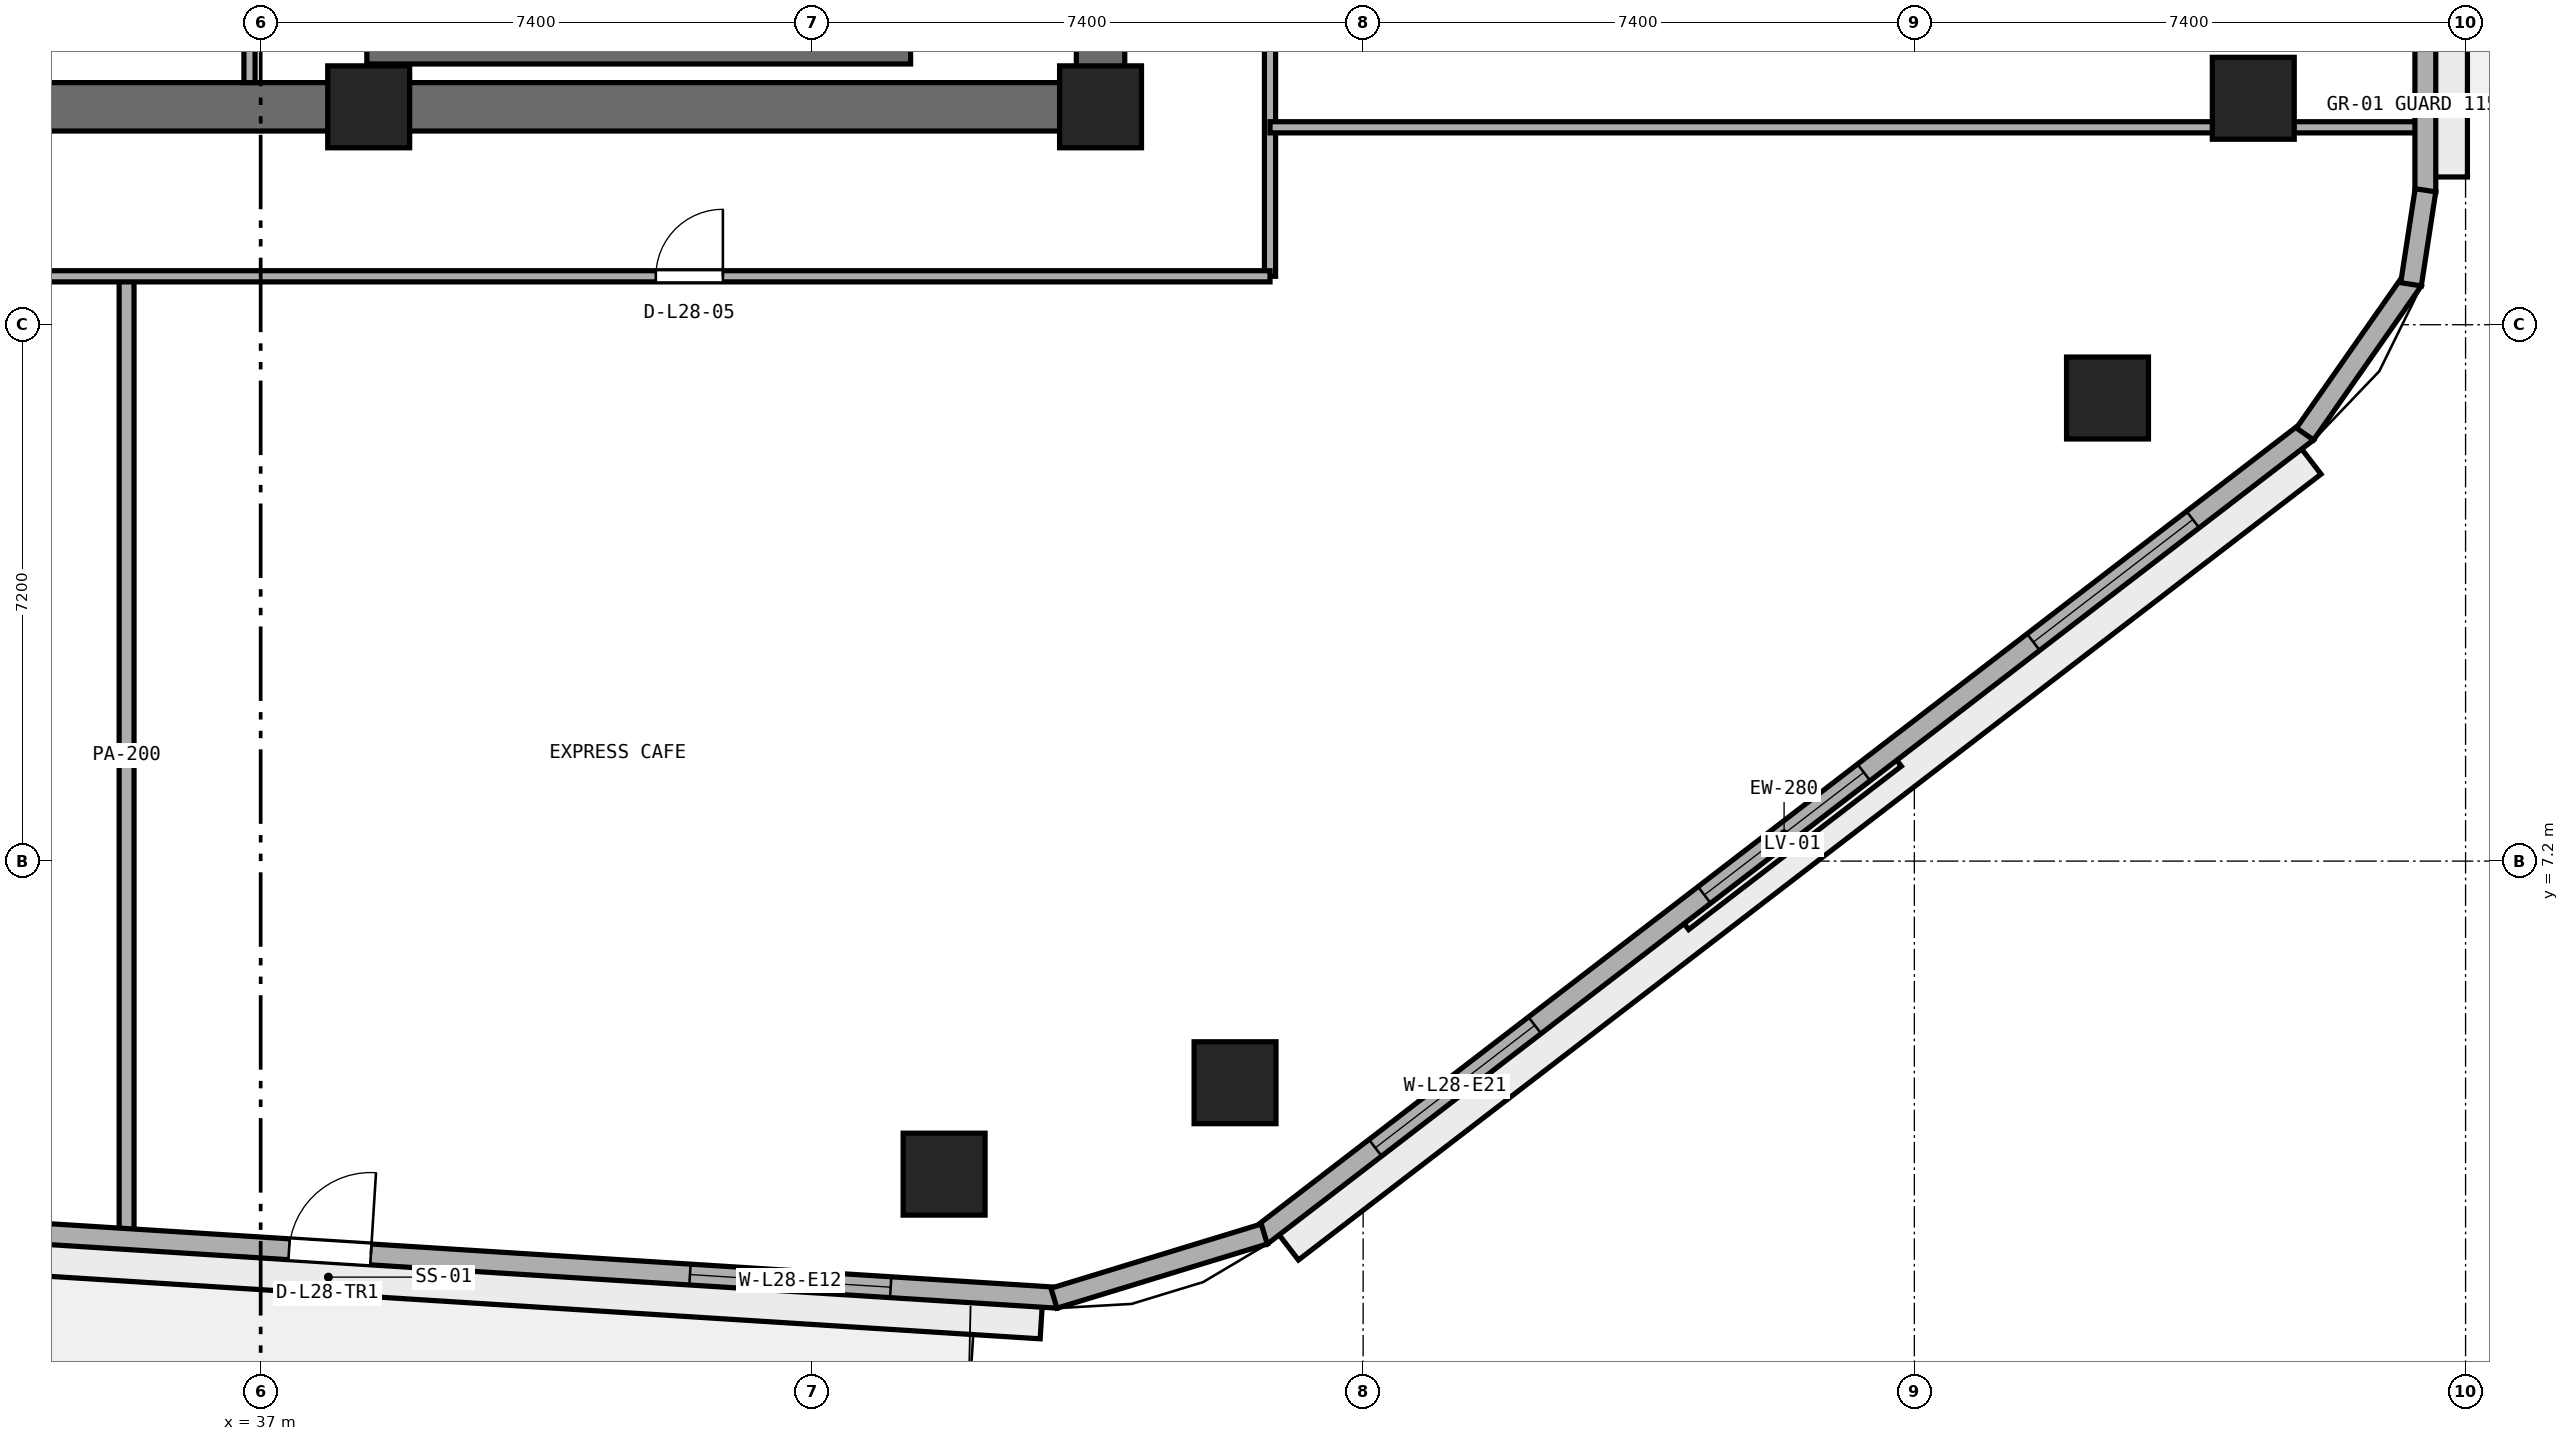
"""IFC4 building model, lengths in metres.
Left out: names, types, materials, properties, quantities, classifications, styles, units other than length and angle.
Written with IfcOpenShell. Run it as: python <this file> out.ifc"""

import sys

from ifc_helpers import new_model, si_unit, direction, frame, frame_2d, origin, origin_2d, place, context, subcontext, project, spatial, rectangle, extrude, element, fill, save


model = new_model("IFC4")
c1 = context("Model", 3, precision=1e-05, world=origin(), true_north=direction((0.0, 1.0)))
c2 = subcontext(c1, "Body", "Model", "MODEL_VIEW")
j1 = project(units=[si_unit("LENGTHUNIT", "METRE"), si_unit("PLANEANGLEUNIT", "RADIAN")], contexts=[c1])
p1 = place(None, origin())
s1 = spatial("IfcSite", under=j1, at=p1, CompositionType="ELEMENT")
p2 = place(p1, origin())
s2 = spatial("IfcBuilding", under=s1, at=p2, CompositionType="ELEMENT")
p3 = place(p2, frame((0.0, 0.0, 112.4)))
s3 = spatial("IfcBuildingStorey", under=s2, at=p3, CompositionType="ELEMENT", Elevation=112.4)
p4 = place(p3, frame((25.4, 17.325, 0.0), z_axis=(0.0, 0.0, 1.0), x_axis=(1.0, 0.0, 0.0)))
e1 = element("IfcWall", 1, at=p4, inside=s3, PredefinedType="SHEAR", context=c2, shape_type="SweptSolid", body=[
    extrude(rectangle(XDim=23.2, YDim=0.65, at=frame_2d((11.6, 0.0))), origin(), (0.0, 0.0, 1.0), 3.525),
])
p5 = place(p3, frame((48.275, 17.65, 0.0), z_axis=(0.0, 0.0, 1.0), x_axis=(0.0, 1.0, 0.0)))
e2 = element("IfcWall", 2, at=p5, inside=s3, PredefinedType="SHEAR", context=c2, shape_type="SweptSolid", body=[
    extrude(rectangle(XDim=15.1, YDim=0.65, at=frame_2d((7.55, 0.0))), origin(), (0.0, 0.0, 1.0), 3.525),
])
p6 = place(p5, frame((5.65, 0.0, 0.0)))
e3 = element("IfcOpeningElement", 3, at=p6, cuts=e2, PredefinedType="OPENING", context=c2, shape_type="SweptSolid", body=[
    extrude(rectangle(XDim=1.5, YDim=2.15, at=frame_2d((0.75, 1.075))), frame((0.0, 0.335, 0.0), z_axis=(0.0, -1.0, 0.0), x_axis=(1.0, 0.0, 0.0)), (0.0, 0.0, 1.0), 0.67),
])
for number, where, z_axis, x_axis in (
    (4, (38.45, 17.325, 0.0), (0.0, 0.0, 1.0), (1.0, 0.0, 0.0)),
    (5, (48.275, 17.325, 0.0), (0.0, 0.0, 1.0), (1.0, 0.0, 0.0)),
):
    element("IfcColumn", number, at=place(p3, frame(where, z_axis=z_axis, x_axis=x_axis)), inside=s3, PredefinedType="PILASTER", context=c2, shape_type="SweptSolid", body=[
        extrude(rectangle(XDim=1.1, YDim=1.1, at=origin_2d()), origin(), (0.0, 0.0, 1.0), 3.8),
    ])
for number, where, z_axis, x_axis in (
    (6, (46.175, 2.998, 0.0), (0.0, 0.0, 1.0), (1.0, 0.0, 0.0)),
    (7, (50.081, 4.225, 0.0), (0.0, 0.0, 1.0), (1.0, 0.0, 0.0)),
    (8, (61.793, 13.416, 0.0), (0.0, 0.0, 1.0), (1.0, 0.0, 0.0)),
    (9, (63.75, 17.44, 0.0), (0.0, 0.0, 1.0), (1.0, 0.0, 0.0)),
):
    element("IfcColumn", number, at=place(p3, frame(where, z_axis=z_axis, x_axis=x_axis)), inside=s3, PredefinedType="COLUMN", context=c2, shape_type="SweptSolid", body=[
        extrude(rectangle(XDim=1.1, YDim=1.1, at=origin_2d()), origin(), (0.0, 0.0, 1.0), 3.8),
    ])
p7 = place(p3, frame((38.425, 18.025, 0.0), z_axis=(0.0, 0.0, 1.0), x_axis=(1.0, 0.0, 0.0)))
e10 = element("IfcWall", 10, at=p7, inside=s3, PredefinedType="SHEAR", context=c2, shape_type="SweptSolid", body=[
    extrude(rectangle(XDim=7.3, YDim=0.25, at=frame_2d((3.65, 0.0))), origin(), (0.0, 0.0, 1.0), 3.525),
])
p8 = place(p3, frame((36.85, 17.65, 0.0), z_axis=(0.0, 0.0, 1.0), x_axis=(0.0, 1.0, 0.0)))
e11 = element("IfcWall", 11, at=p8, inside=s3, PredefinedType="PARTITIONING", context=c2, shape_type="SweptSolid", body=[
    extrude(rectangle(XDim=2.1, YDim=0.15, at=frame_2d((1.05, 0.0))), origin(), (0.0, 0.0, 1.0), 3.525),
])
p9 = place(p3, frame((50.55, 15.05, 0.0), z_axis=(0.0, 0.0, 1.0), x_axis=(0.0, 1.0, 0.0)))
e12 = element("IfcWall", 12, at=p9, inside=s3, PredefinedType="PARTITIONING", context=c2, shape_type="SweptSolid", body=[
    extrude(rectangle(XDim=20.3, YDim=0.15, at=frame_2d((10.15, 0.0))), origin(), (0.0, 0.0, 1.0), 3.525),
])
p10 = place(p9, frame((9.7, 0.0, 0.0)))
e13 = element("IfcOpeningElement", 13, at=p10, cuts=e12, PredefinedType="OPENING", context=c2, shape_type="SweptSolid", body=[
    extrude(rectangle(XDim=0.9, YDim=2.1, at=frame_2d((0.45, 1.05))), frame((0.0, 0.085, 0.0), z_axis=(0.0, -1.0, 0.0), x_axis=(1.0, 0.0, 0.0)), (0.0, 0.0, 1.0), 0.17),
])
p11 = place(p3, frame((35.2, 2.192, 0.0), z_axis=(0.0, 0.0, 1.0), x_axis=(0.0, 1.0, 0.0)))
e14 = element("IfcWall", 14, at=p11, inside=s3, PredefinedType="PARTITIONING", context=c2, shape_type="SweptSolid", body=[
    extrude(rectangle(XDim=12.858, YDim=0.2, at=frame_2d((6.429, 0.0))), origin(), (0.0, 0.0, 1.0), 3.525),
])
p12 = place(p3, frame((23.45, 15.05, 0.0), z_axis=(0.0, 0.0, 1.0), x_axis=(1.0, 0.0, 0.0)))
e15 = element("IfcWall", 15, at=p12, inside=s3, PredefinedType="PARTITIONING", context=c2, shape_type="SweptSolid", body=[
    extrude(rectangle(XDim=27.1, YDim=0.15, at=frame_2d((13.55, 0.0))), origin(), (0.0, 0.0, 1.0), 3.525),
])
p13 = place(p12, frame((5.17, 0.0, 0.0)))
e16 = element("IfcOpeningElement", 16, at=p13, cuts=e15, PredefinedType="OPENING", context=c2, shape_type="SweptSolid", body=[
    extrude(rectangle(XDim=1.65, YDim=2.15, at=frame_2d((0.825, 1.075))), frame((0.0, 0.085, 0.0), z_axis=(0.0, -1.0, 0.0), x_axis=(1.0, 0.0, 0.0)), (0.0, 0.0, 1.0), 0.17),
])
p14 = place(p12, frame((18.855, 0.0, 0.0)))
e17 = element("IfcOpeningElement", 17, at=p14, cuts=e15, PredefinedType="OPENING", context=c2, shape_type="SweptSolid", body=[
    extrude(rectangle(XDim=0.9, YDim=2.1, at=frame_2d((0.45, 1.05))), frame((0.0, 0.085, 0.0), z_axis=(0.0, -1.0, 0.0), x_axis=(1.0, 0.0, 0.0)), (0.0, 0.0, 1.0), 0.17),
])
p15 = place(p3, frame((50.55, 17.05, 0.0), z_axis=(0.0, 0.0, 1.0), x_axis=(1.0, 0.0, 0.0)))
e18 = element("IfcWall", 18, at=p15, inside=s3, PredefinedType="PARTITIONING", context=c2, shape_type="SweptSolid", body=[
    extrude(rectangle(XDim=15.445, YDim=0.15, at=frame_2d((7.723, 0.0))), origin(), (0.0, 0.0, 1.0), 3.525),
])
p16 = place(p3, frame((28.161, 2.571, 0.0), z_axis=(0.0, 0.0, 1.0), x_axis=(0.998017288298, -0.06294038654, 0.0)))
e19 = element("IfcWall", 19, at=p16, inside=s3, PredefinedType="STANDARD", context=c2, shape_type="SweptSolid", body=[
    extrude(rectangle(XDim=19.577, YDim=0.28, at=frame_2d((9.789, 0.0))), origin(), (0.0, 0.0, 1.0), 3.525),
])
p17 = place(p16, frame((9.239, 0.0, 0.0)))
e20 = element("IfcOpeningElement", 20, at=p17, cuts=e19, PredefinedType="OPENING", context=c2, shape_type="SweptSolid", body=[
    extrude(rectangle(XDim=1.1, YDim=2.2, at=frame_2d((0.55, 1.1))), frame((0.0, 0.15, 0.0), z_axis=(0.0, -1.0, 0.0), x_axis=(1.0, 0.0, 0.0)), (0.0, 0.0, 1.0), 0.3),
])
p18 = place(p16, frame((2.246, 0.0, 0.9)))
e21 = element("IfcOpeningElement", 21, at=p18, cuts=e19, PredefinedType="OPENING", context=c2, shape_type="SweptSolid", body=[
    extrude(rectangle(XDim=2.7, YDim=1.75, at=frame_2d((1.35, 0.875))), frame((0.0, 0.15, 0.0), z_axis=(0.0, -1.0, 0.0), x_axis=(1.0, 0.0, 0.0)), (0.0, 0.0, 1.0), 0.3),
])
p19 = place(p16, frame((14.631, 0.0, 0.9)))
e22 = element("IfcOpeningElement", 22, at=p19, cuts=e19, PredefinedType="OPENING", context=c2, shape_type="SweptSolid", body=[
    extrude(rectangle(XDim=2.7, YDim=1.75, at=frame_2d((1.35, 0.875))), frame((0.0, 0.15, 0.0), z_axis=(0.0, -1.0, 0.0), x_axis=(1.0, 0.0, 0.0)), (0.0, 0.0, 1.0), 0.3),
])
p20 = place(p3, frame((50.429, 2.172, 0.0), z_axis=(0.0, 0.0, 1.0), x_axis=(0.792937466367, 0.609303023488, 0.0)))
e23 = element("IfcWall", 23, at=p20, inside=s3, PredefinedType="STANDARD", context=c2, shape_type="SweptSolid", body=[
    extrude(rectangle(XDim=17.713, YDim=0.28, at=frame_2d((8.856, 0.0))), origin(), (0.0, 0.0, 1.0), 3.525),
])
p21 = place(p20, frame((1.936, 0.0, 0.9)))
e24 = element("IfcOpeningElement", 24, at=p21, cuts=e23, PredefinedType="OPENING", context=c2, shape_type="SweptSolid", body=[
    extrude(rectangle(XDim=2.7, YDim=1.75, at=frame_2d((1.35, 0.875))), frame((0.0, 0.15, 0.0), z_axis=(0.0, -1.0, 0.0), x_axis=(1.0, 0.0, 0.0)), (0.0, 0.0, 1.0), 0.3),
])
p22 = place(p20, frame((7.506, 0.0, 0.9)))
e25 = element("IfcOpeningElement", 25, at=p22, cuts=e23, PredefinedType="OPENING", context=c2, shape_type="SweptSolid", body=[
    extrude(rectangle(XDim=2.7, YDim=1.75, at=frame_2d((1.35, 0.875))), frame((0.0, 0.15, 0.0), z_axis=(0.0, -1.0, 0.0), x_axis=(1.0, 0.0, 0.0)), (0.0, 0.0, 1.0), 0.3),
])
p23 = place(p20, frame((13.077, 0.0, 0.9)))
e26 = element("IfcOpeningElement", 26, at=p23, cuts=e23, PredefinedType="OPENING", context=c2, shape_type="SweptSolid", body=[
    extrude(rectangle(XDim=2.7, YDim=1.75, at=frame_2d((1.35, 0.875))), frame((0.0, 0.15, 0.0), z_axis=(0.0, -1.0, 0.0), x_axis=(1.0, 0.0, 0.0)), (0.0, 0.0, 1.0), 0.3),
])
p24 = place(p3, frame((66.06, 16.183, 0.0), z_axis=(0.0, 0.0, 1.0), x_axis=(0.0, 1.0, 0.0)))
e27 = element("IfcWall", 27, at=p24, inside=s3, PredefinedType="STANDARD", context=c2, shape_type="SweptSolid", body=[
    extrude(rectangle(XDim=19.331, YDim=0.28, at=frame_2d((9.666, 0.0))), origin(), (0.0, 0.0, 1.0), 3.525),
])
p25 = place(p24, frame((9.115, 0.0, 0.0)))
e28 = element("IfcOpeningElement", 28, at=p25, cuts=e27, PredefinedType="OPENING", context=c2, shape_type="SweptSolid", body=[
    extrude(rectangle(XDim=1.1, YDim=2.2, at=frame_2d((0.55, 1.1))), frame((0.0, 0.15, 0.0), z_axis=(0.0, -1.0, 0.0), x_axis=(1.0, 0.0, 0.0)), (0.0, 0.0, 1.0), 0.3),
])
p26 = place(p24, frame((2.205, 0.0, 0.9)))
e29 = element("IfcOpeningElement", 29, at=p26, cuts=e27, PredefinedType="OPENING", context=c2, shape_type="SweptSolid", body=[
    extrude(rectangle(XDim=2.7, YDim=1.75, at=frame_2d((1.35, 0.875))), frame((0.0, 0.15, 0.0), z_axis=(0.0, -1.0, 0.0), x_axis=(1.0, 0.0, 0.0)), (0.0, 0.0, 1.0), 0.3),
])
p27 = place(p24, frame((13.926, 0.0, 0.9)))
e30 = element("IfcOpeningElement", 30, at=p27, cuts=e27, PredefinedType="OPENING", context=c2, shape_type="SweptSolid", body=[
    extrude(rectangle(XDim=2.7, YDim=1.75, at=frame_2d((1.35, 0.875))), frame((0.0, 0.15, 0.0), z_axis=(0.0, -1.0, 0.0), x_axis=(1.0, 0.0, 0.0)), (0.0, 0.0, 1.0), 0.3),
])
p28 = place(p3, frame((47.65, 1.333, 0.0), z_axis=(0.0, 0.0, 1.0), x_axis=(0.956461287977, 0.291859220516, 0.0)))
e31 = element("IfcWall", 31, at=p28, inside=s3, PredefinedType="STANDARD", context=c2, shape_type="SweptSolid", body=[
    extrude(rectangle(XDim=2.952, YDim=0.28, at=frame_2d((1.476, 0.0))), origin(), (0.0, 0.0, 1.0), 3.525),
])
p29 = place(p3, frame((64.444, 12.933, 0.0), z_axis=(0.0, 0.0, 1.0), x_axis=(0.573176686443, 0.819431806875, 0.0)))
e32 = element("IfcWall", 32, at=p29, inside=s3, PredefinedType="STANDARD", context=c2, shape_type="SweptSolid", body=[
    extrude(rectangle(XDim=2.524, YDim=0.28, at=frame_2d((1.262, 0.0))), origin(), (0.0, 0.0, 1.0), 3.525),
])
p30 = place(p3, frame((65.867, 14.943, 0.0), z_axis=(0.0, 0.0, 1.0), x_axis=(0.152014078361, 0.988378328364, 0.0)))
e33 = element("IfcWall", 33, at=p30, inside=s3, PredefinedType="STANDARD", context=c2, shape_type="SweptSolid", body=[
    extrude(rectangle(XDim=1.277, YDim=0.28, at=frame_2d((0.638, 0.0))), origin(), (0.0, 0.0, 1.0), 3.525),
])
p31 = place(p14, origin())
e34 = element("IfcDoor", 34, at=p31, inside=s3, OperationType="SINGLE_SWING_RIGHT", PredefinedType="DOOR", context=c2, shape_type="SweptSolid", body=[
    extrude(rectangle(XDim=0.9, YDim=2.1, at=frame_2d((0.45, 1.05))), frame((0.0, 0.025, 0.0), z_axis=(0.0, -1.0, 0.0), x_axis=(1.0, 0.0, 0.0)), (0.0, 0.0, 1.0), 0.05),
])
fill(e17, e34)
p32 = place(p17, origin())
e35 = element("IfcDoor", 35, at=p32, inside=s3, OperationType="SINGLE_SWING_RIGHT", PredefinedType="DOOR", context=c2, shape_type="SweptSolid", body=[
    extrude(rectangle(XDim=1.1, YDim=2.2, at=frame_2d((0.55, 1.1))), frame((0.0, 0.025, 0.0), z_axis=(0.0, -1.0, 0.0), x_axis=(1.0, 0.0, 0.0)), (0.0, 0.0, 1.0), 0.05),
])
fill(e20, e35)
p33 = place(p19, origin())
e36 = element("IfcWindow", 36, at=p33, inside=s3, PartitioningType="SINGLE_PANEL", PredefinedType="WINDOW", context=c2, shape_type="SweptSolid", body=[
    extrude(rectangle(XDim=2.7, YDim=1.75, at=frame_2d((1.35, 0.875))), frame((0.0, 0.03, 0.0), z_axis=(0.0, -1.0, 0.0), x_axis=(1.0, 0.0, 0.0)), (0.0, 0.0, 1.0), 0.06),
])
fill(e22, e36)
p34 = place(p21, origin())
e37 = element("IfcWindow", 37, at=p34, inside=s3, PartitioningType="SINGLE_PANEL", PredefinedType="WINDOW", context=c2, shape_type="SweptSolid", body=[
    extrude(rectangle(XDim=2.7, YDim=1.75, at=frame_2d((1.35, 0.875))), frame((0.0, 0.03, 0.0), z_axis=(0.0, -1.0, 0.0), x_axis=(1.0, 0.0, 0.0)), (0.0, 0.0, 1.0), 0.06),
])
fill(e24, e37)
p35 = place(p22, origin())
e38 = element("IfcWindow", 38, at=p35, inside=s3, PartitioningType="SINGLE_PANEL", PredefinedType="WINDOW", context=c2, shape_type="SweptSolid", body=[
    extrude(rectangle(XDim=2.7, YDim=1.75, at=frame_2d((1.35, 0.875))), frame((0.0, 0.03, 0.0), z_axis=(0.0, -1.0, 0.0), x_axis=(1.0, 0.0, 0.0)), (0.0, 0.0, 1.0), 0.06),
])
fill(e25, e38)
p36 = place(p23, origin())
e39 = element("IfcWindow", 39, at=p36, inside=s3, PartitioningType="SINGLE_PANEL", PredefinedType="WINDOW", context=c2, shape_type="SweptSolid", body=[
    extrude(rectangle(XDim=2.7, YDim=1.75, at=frame_2d((1.35, 0.875))), frame((0.0, 0.03, 0.0), z_axis=(0.0, -1.0, 0.0), x_axis=(1.0, 0.0, 0.0)), (0.0, 0.0, 1.0), 0.06),
])
fill(e26, e39)
save(model, sys.argv[1])
